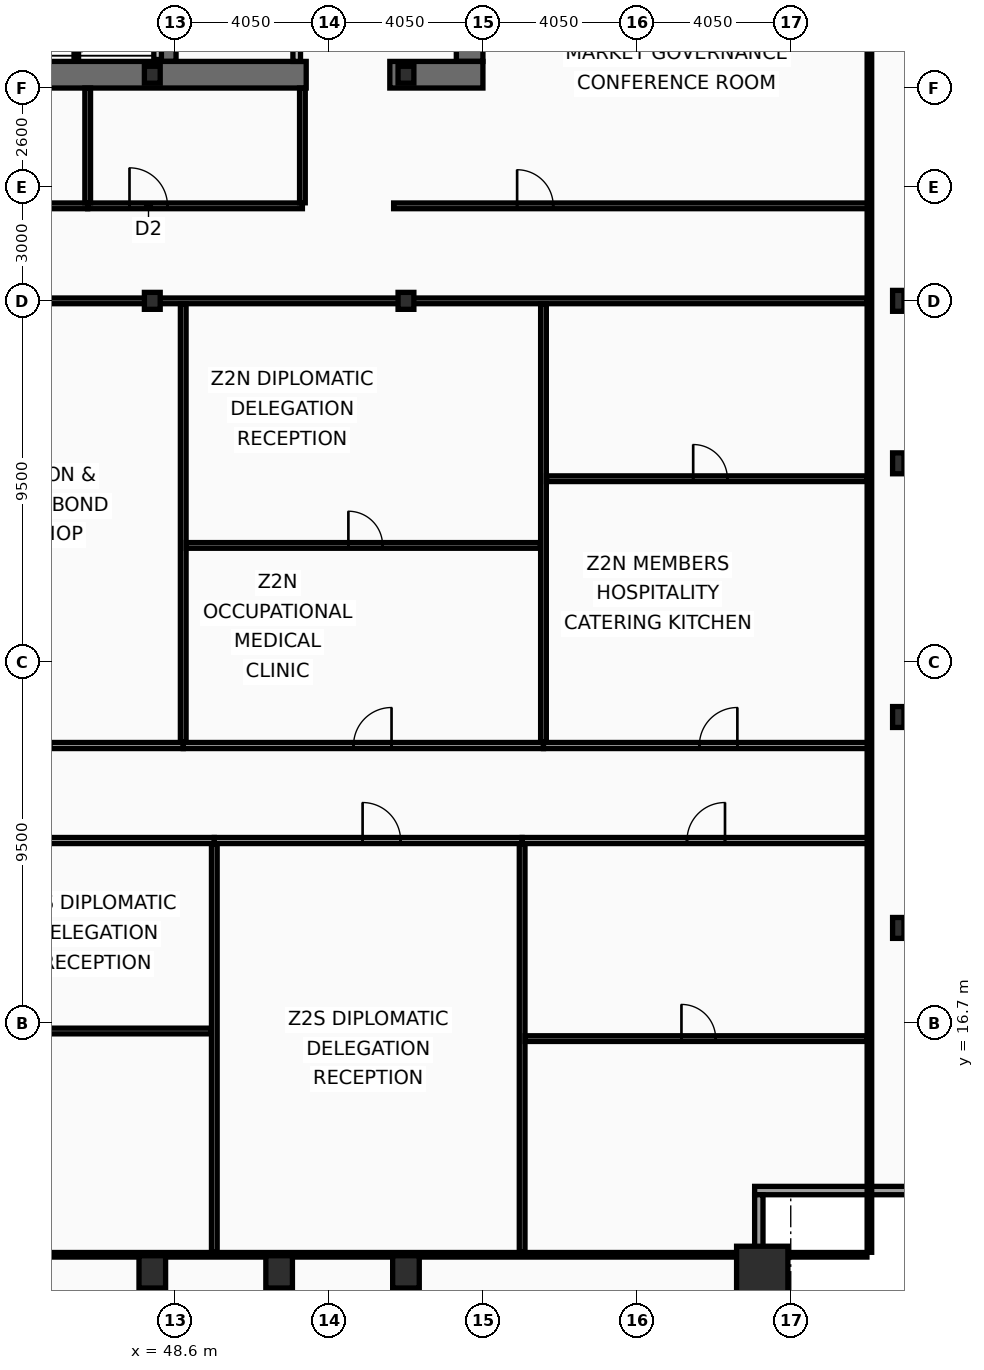
"""IFC4 building model, lengths in metres.
Left out: names, types, materials, properties, quantities, classifications, styles, units other than length and angle.
Written with IfcOpenShell. Run it as: python <this file> out.ifc"""

import sys

from ifc_helpers import new_model, si_unit, direction, frame, frame_2d, origin, origin_2d, place, context, subcontext, project, spatial, rectangle, hollow_rectangle, i_section, extrude, element, fill, save


model = new_model("IFC4")
c1 = context("Model", 3, precision=1e-05, world=origin(), true_north=direction((0.0, 1.0)))
c2 = subcontext(c1, "Body", "Model", "MODEL_VIEW")
j1 = project(units=[si_unit("LENGTHUNIT", "METRE"), si_unit("PLANEANGLEUNIT", "RADIAN")], contexts=[c1])
p1 = place(None, origin())
s1 = spatial("IfcSite", under=j1, at=p1, CompositionType="ELEMENT")
p2 = place(p1, origin())
s2 = spatial("IfcBuilding", under=s1, at=p2, CompositionType="ELEMENT")
p3 = place(p2, frame((0.0, 0.0, 165.0)))
s3 = spatial("IfcBuildingStorey", under=s2, at=p3, CompositionType="ELEMENT", Elevation=165.0)
p4 = place(p3, frame((56.35, 53.0, 0.0), z_axis=(0.0, 0.0, 1.0), x_axis=(0.0, -1.0, 0.0)))
e1 = element("IfcWall", 1, at=p4, inside=s3, PredefinedType="SHEAR", context=c2, shape_type="SweptSolid", body=[
    extrude(rectangle(XDim=11.0, YDim=0.7, at=frame_2d((5.5, 0.0))), origin(), (0.0, 0.0, 1.0), 3.44),
])
p5 = place(p3, frame((48.4, 42.0, 0.0), z_axis=(0.0, 0.0, 1.0), x_axis=(0.0, 1.0, 0.0)))
e2 = element("IfcWall", 2, at=p5, inside=s3, PredefinedType="SHEAR", context=c2, shape_type="SweptSolid", body=[
    extrude(rectangle(XDim=11.0, YDim=0.45, at=frame_2d((5.5, 0.0))), origin(), (0.0, 0.0, 1.0), 3.44),
])
p6 = place(p3, frame((52.05, 41.65, 0.0), z_axis=(0.0, 0.0, 1.0), x_axis=(-1.0, 0.0, 0.0)))
e3 = element("IfcWall", 3, at=p6, inside=s3, PredefinedType="SHEAR", context=c2, shape_type="SweptSolid", body=[
    extrude(rectangle(XDim=11.3, YDim=0.7, at=frame_2d((5.65, 0.0))), origin(), (0.0, 0.0, 1.0), 3.44),
])
p7 = place(p3, frame((56.7, 41.65, 0.0), z_axis=(0.0, 0.0, 1.0), x_axis=(-1.0, 0.0, 0.0)))
e4 = element("IfcWall", 4, at=p7, inside=s3, PredefinedType="SHEAR", context=c2, shape_type="SweptSolid", body=[
    extrude(rectangle(XDim=2.45, YDim=0.7, at=frame_2d((1.225, 0.0))), origin(), (0.0, 0.0, 1.0), 3.44),
])
p8 = place(p3, frame((64.05, 10.15, 0.0), z_axis=(0.0, 0.0, 1.0), x_axis=(1.0, 0.0, 0.0)))
e5 = element("IfcColumn", 5, at=p8, inside=s3, PredefinedType="COLUMN", context=c2, shape_type="SweptSolid", body=[
    extrude(hollow_rectangle(XDim=1.35, YDim=1.35, WallThickness=0.065, at=origin_2d()), origin(), (0.0, 0.0, 1.0), 3.6),
])
for number, where, z_axis, x_axis in (
    (6, (48.0, 10.15, 0.0), (0.0, 0.0, 1.0), (1.0, 0.0, 0.0)),
    (7, (51.337, 10.15, 0.0), (0.0, 0.0, 1.0), (1.0, 0.0, 0.0)),
    (8, (54.675, 10.15, 0.0), (0.0, 0.0, 1.0), (1.0, 0.0, 0.0)),
):
    element("IfcColumn", number, at=place(p3, frame(where, z_axis=z_axis, x_axis=x_axis)), inside=s3, PredefinedType="COLUMN", context=c2, shape_type="SweptSolid", body=[
        extrude(hollow_rectangle(XDim=0.7, YDim=0.85, WallThickness=0.05, at=origin_2d()), origin(), (0.0, 0.0, 1.0), 3.6),
    ])
for number, where, z_axis, x_axis in (
    (9, (67.63, 19.2, 0.0), (0.0, 0.0, 1.0), (1.0, 0.0, 0.0)),
    (10, (67.63, 24.75, 0.0), (0.0, 0.0, 1.0), (1.0, 0.0, 0.0)),
    (11, (67.63, 31.425, 0.0), (0.0, 0.0, 1.0), (1.0, 0.0, 0.0)),
    (12, (67.63, 35.7, 0.0), (0.0, 0.0, 1.0), (1.0, 0.0, 0.0)),
):
    element("IfcColumn", number, at=place(p3, frame(where, z_axis=z_axis, x_axis=x_axis)), inside=s3, PredefinedType="COLUMN", context=c2, shape_type="SweptSolid", body=[
        extrude(i_section(OverallWidth=0.3, OverallDepth=0.55, WebThickness=0.015, FlangeThickness=0.029, at=origin_2d()), origin(), (0.0, 0.0, 1.0), 3.6),
    ])
for number, where, z_axis, x_axis in (
    (13, (48.0, 35.7, 0.0), (0.0, 0.0, 1.0), (1.0, 0.0, 0.0)),
    (14, (48.0, 41.65, 0.0), (0.0, 0.0, 1.0), (1.0, 0.0, 0.0)),
    (15, (54.675, 35.7, 0.0), (0.0, 0.0, 1.0), (1.0, 0.0, 0.0)),
    (16, (54.675, 41.65, 0.0), (0.0, 0.0, 1.0), (1.0, 0.0, 0.0)),
):
    element("IfcColumn", number, at=place(p3, frame(where, z_axis=z_axis, x_axis=x_axis)), inside=s3, PredefinedType="COLUMN", context=c2, shape_type="SweptSolid", body=[
        extrude(i_section(OverallWidth=0.416, OverallDepth=0.446, WebThickness=0.039, FlangeThickness=0.063, at=origin_2d()), origin(), (0.0, 0.0, 1.0), 3.6),
    ])
p9 = place(p3, frame((68.07, 12.29, 0.0), z_axis=(0.0, 0.0, 1.0), x_axis=(-1.0, 0.0, 0.0)))
e17 = element("IfcWall", 17, at=p9, inside=s3, PredefinedType="SOLIDWALL", context=c2, shape_type="SweptSolid", body=[
    extrude(rectangle(XDim=4.22, YDim=0.22, at=frame_2d((2.11, 0.0))), origin(), (0.0, 0.0, 1.0), 2.83),
])
p10 = place(p3, frame((63.96, 12.18, 0.0), z_axis=(0.0, 0.0, 1.0), x_axis=(0.0, -1.0, 0.0)))
e18 = element("IfcWall", 18, at=p10, inside=s3, PredefinedType="SOLIDWALL", context=c2, shape_type="SweptSolid", body=[
    extrude(rectangle(XDim=3.91, YDim=0.22, at=frame_2d((1.955, 0.0))), origin(), (0.0, 0.0, 1.0), 2.83),
])
p11 = place(p3, frame((51.8, 42.0, 0.0), z_axis=(0.0, 0.0, 1.0), x_axis=(0.0, 1.0, 0.0)))
e19 = element("IfcWall", 19, at=p11, inside=s3, PredefinedType="PARTITIONING", context=c2, shape_type="SweptSolid", body=[
    extrude(rectangle(XDim=2.495, YDim=0.2, at=frame_2d((1.248, 0.0))), origin(), (0.0, 0.0, 1.0), 3.44),
])
p12 = place(p11, frame((0.38, 0.0, 0.0)))
e20 = element("IfcOpeningElement", 20, at=p12, cuts=e19, PredefinedType="OPENING", context=c2, shape_type="SweptSolid", body=[
    extrude(rectangle(XDim=1.05, YDim=2.15, at=frame_2d((0.525, 1.075))), frame((0.0, 0.11, 0.0), z_axis=(0.0, -1.0, 0.0), x_axis=(1.0, 0.0, 0.0)), (0.0, 0.0, 1.0), 0.22),
])
p13 = place(p3, frame((48.14, 42.05, 0.0), z_axis=(0.0, 0.0, 1.0), x_axis=(0.0, 1.0, 0.0)))
e21 = element("IfcWall", 21, at=p13, inside=s3, PredefinedType="PARTITIONING", context=c2, shape_type="SweptSolid", body=[
    extrude(rectangle(XDim=2.195, YDim=0.2, at=frame_2d((1.098, 0.0))), origin(), (0.0, 0.0, 1.0), 3.44),
])
p14 = place(p3, frame((46.0, 42.05, 0.0), z_axis=(0.0, 0.0, 1.0), x_axis=(0.0, 1.0, 0.0)))
e22 = element("IfcWall", 22, at=p14, inside=s3, PredefinedType="PARTITIONING", context=c2, shape_type="SweptSolid", body=[
    extrude(rectangle(XDim=2.195, YDim=0.12, at=frame_2d((1.098, 0.0))), origin(), (0.0, 0.0, 1.0), 3.44),
])
p15 = place(p3, frame((40.88, 38.2, 0.0), z_axis=(0.0, 0.0, 1.0), x_axis=(1.0, 0.0, 0.0)))
e23 = element("IfcWall", 23, at=p15, inside=s3, PredefinedType="PARTITIONING", context=c2, shape_type="SweptSolid", body=[
    extrude(rectangle(XDim=5.42, YDim=0.15, at=frame_2d((2.71, 0.0))), origin(), (0.0, 0.0, 1.0), 2.73),
])
p16 = place(p15, frame((1.1, 0.0, 0.0)))
e24 = element("IfcOpeningElement", 24, at=p16, cuts=e23, PredefinedType="OPENING", context=c2, shape_type="SweptSolid", body=[
    extrude(rectangle(XDim=0.9, YDim=2.05, at=frame_2d((0.45, 1.025))), frame((0.0, 0.085, 0.0), z_axis=(0.0, -1.0, 0.0), x_axis=(1.0, 0.0, 0.0)), (0.0, 0.0, 1.0), 0.17),
])
p17 = place(p3, frame((46.3, 38.2, 0.0), z_axis=(0.0, 0.0, 1.0), x_axis=(1.0, 0.0, 0.0)))
e25 = element("IfcWall", 25, at=p17, inside=s3, PredefinedType="PARTITIONING", context=c2, shape_type="SweptSolid", body=[
    extrude(rectangle(XDim=5.65, YDim=0.15, at=frame_2d((2.825, 0.0))), origin(), (0.0, 0.0, 1.0), 2.73),
])
p18 = place(p17, frame((1.1, 0.0, 0.0)))
e26 = element("IfcOpeningElement", 26, at=p18, cuts=e25, PredefinedType="OPENING", context=c2, shape_type="SweptSolid", body=[
    extrude(rectangle(XDim=1.0, YDim=2.05, at=frame_2d((0.5, 1.025))), frame((0.0, 0.085, 0.0), z_axis=(0.0, -1.0, 0.0), x_axis=(1.0, 0.0, 0.0)), (0.0, 0.0, 1.0), 0.17),
])
for number, where, z_axis, x_axis in (
    (27, (46.3, 38.28, 0.0), (0.0, 0.0, 1.0), (0.0, 1.0, 0.0)),
    (28, (51.95, 38.28, 0.0), (0.0, 0.0, 1.0), (0.0, 1.0, 0.0)),
):
    element("IfcWall", number, at=place(p3, frame(where, z_axis=z_axis, x_axis=x_axis)), inside=s3, PredefinedType="PARTITIONING", context=c2, shape_type="SweptSolid", body=[
        extrude(rectangle(XDim=3.02, YDim=0.15, at=frame_2d((1.51, 0.0))), origin(), (0.0, 0.0, 1.0), 3.44),
    ])
p19 = place(p3, frame((54.35, 38.2, 0.0), z_axis=(0.0, 0.0, 1.0), x_axis=(1.0, 0.0, 0.0)))
e29 = element("IfcWall", 29, at=p19, inside=s3, PredefinedType="PARTITIONING", context=c2, shape_type="SweptSolid", body=[
    extrude(rectangle(XDim=12.52, YDim=0.15, at=frame_2d((6.26, 0.0))), origin(), (0.0, 0.0, 1.0), 2.73),
])
p20 = place(p19, frame((3.25, 0.0, 0.0)))
e30 = element("IfcOpeningElement", 30, at=p20, cuts=e29, PredefinedType="OPENING", context=c2, shape_type="SweptSolid", body=[
    extrude(rectangle(XDim=0.95, YDim=2.05, at=frame_2d((0.475, 1.025))), frame((0.0, 0.085, 0.0), z_axis=(0.0, -1.0, 0.0), x_axis=(1.0, 0.0, 0.0)), (0.0, 0.0, 1.0), 0.17),
])
p21 = place(p3, frame((37.631, 21.5, 0.0), z_axis=(0.0, 0.0, 1.0), x_axis=(1.0, 0.0, 0.0)))
e31 = element("IfcWall", 31, at=p21, inside=s3, PredefinedType="PARTITIONING", context=c2, shape_type="SweptSolid", body=[
    extrude(rectangle(XDim=12.0, YDim=0.16, at=frame_2d((6.0, 0.0))), origin(), (0.0, 0.0, 1.0), 2.73),
])
p22 = place(p21, frame((5.54, 0.0, 0.0)))
e32 = element("IfcOpeningElement", 32, at=p22, cuts=e31, PredefinedType="OPENING", context=c2, shape_type="SweptSolid", body=[
    extrude(rectangle(XDim=1.0, YDim=2.05, at=frame_2d((0.5, 1.025))), frame((0.0, 0.09, 0.0), z_axis=(0.0, -1.0, 0.0), x_axis=(1.0, 0.0, 0.0)), (0.0, 0.0, 1.0), 0.18),
])
p23 = place(p3, frame((37.711, 16.488, 0.0), z_axis=(0.0, 0.0, 1.0), x_axis=(1.0, 0.0, 0.0)))
e33 = element("IfcWall", 33, at=p23, inside=s3, PredefinedType="PARTITIONING", context=c2, shape_type="SweptSolid", body=[
    extrude(rectangle(XDim=11.841, YDim=0.15, at=frame_2d((5.92, 0.0))), origin(), (0.0, 0.0, 1.0), 2.73),
])
p24 = place(p23, frame((5.4, 0.0, 0.0)))
e34 = element("IfcOpeningElement", 34, at=p24, cuts=e33, PredefinedType="OPENING", context=c2, shape_type="SweptSolid", body=[
    extrude(rectangle(XDim=0.9, YDim=2.05, at=frame_2d((0.45, 1.025))), frame((0.0, 0.085, 0.0), z_axis=(0.0, -1.0, 0.0), x_axis=(1.0, 0.0, 0.0)), (0.0, 0.0, 1.0), 0.17),
])
p25 = place(p3, frame((49.632, 21.5, 0.0), z_axis=(0.0, 0.0, 1.0), x_axis=(1.0, 0.0, 0.0)))
e35 = element("IfcWall", 35, at=p25, inside=s3, PredefinedType="PARTITIONING", context=c2, shape_type="SweptSolid", body=[
    extrude(rectangle(XDim=8.1, YDim=0.16, at=frame_2d((4.05, 0.0))), origin(), (0.0, 0.0, 1.0), 2.73),
])
p26 = place(p25, frame((3.902, 0.0, 0.0)))
e36 = element("IfcOpeningElement", 36, at=p26, cuts=e35, PredefinedType="OPENING", context=c2, shape_type="SweptSolid", body=[
    extrude(rectangle(XDim=1.0, YDim=2.05, at=frame_2d((0.5, 1.025))), frame((0.0, 0.09, 0.0), z_axis=(0.0, -1.0, 0.0), x_axis=(1.0, 0.0, 0.0)), (0.0, 0.0, 1.0), 0.18),
])
p27 = place(p3, frame((49.632, 10.665, 0.0), z_axis=(0.0, 0.0, 1.0), x_axis=(0.0, 1.0, 0.0)))
e37 = element("IfcWall", 37, at=p27, inside=s3, PredefinedType="PARTITIONING", context=c2, shape_type="SweptSolid", body=[
    extrude(rectangle(XDim=10.75, YDim=0.15, at=frame_2d((5.375, 0.0))), origin(), (0.0, 0.0, 1.0), 2.93),
])
p28 = place(p3, frame((57.732, 21.5, 0.0), z_axis=(0.0, 0.0, 1.0), x_axis=(1.0, 0.0, 0.0)))
e38 = element("IfcWall", 38, at=p28, inside=s3, PredefinedType="PARTITIONING", context=c2, shape_type="SweptSolid", body=[
    extrude(rectangle(XDim=9.138, YDim=0.16, at=frame_2d((4.569, 0.0))), origin(), (0.0, 0.0, 1.0), 3.44),
])
p29 = place(p28, frame((4.338, 0.0, 0.0)))
e39 = element("IfcOpeningElement", 39, at=p29, cuts=e38, PredefinedType="OPENING", context=c2, shape_type="SweptSolid", body=[
    extrude(rectangle(XDim=1.0, YDim=2.05, at=frame_2d((0.5, 1.025))), frame((0.0, 0.09, 0.0), z_axis=(0.0, -1.0, 0.0), x_axis=(1.0, 0.0, 0.0)), (0.0, 0.0, 1.0), 0.18),
])
p30 = place(p3, frame((57.732, 10.665, 0.0), z_axis=(0.0, 0.0, 1.0), x_axis=(0.0, 1.0, 0.0)))
e40 = element("IfcWall", 40, at=p30, inside=s3, PredefinedType="PARTITIONING", context=c2, shape_type="SweptSolid", body=[
    extrude(rectangle(XDim=10.75, YDim=0.15, at=frame_2d((5.375, 0.0))), origin(), (0.0, 0.0, 1.0), 2.73),
])
p31 = place(p3, frame((57.812, 16.288, 0.0), z_axis=(0.0, 0.0, 1.0), x_axis=(1.0, 0.0, 0.0)))
e41 = element("IfcWall", 41, at=p31, inside=s3, PredefinedType="PARTITIONING", context=c2, shape_type="SweptSolid", body=[
    extrude(rectangle(XDim=8.993, YDim=0.15, at=frame_2d((4.497, 0.0))), origin(), (0.0, 0.0, 1.0), 2.83),
])
p32 = place(p31, frame((4.112, 0.0, 0.0)))
e42 = element("IfcOpeningElement", 42, at=p32, cuts=e41, PredefinedType="OPENING", context=c2, shape_type="SweptSolid", body=[
    extrude(rectangle(XDim=0.9, YDim=2.05, at=frame_2d((0.45, 1.025))), frame((0.0, 0.085, 0.0), z_axis=(0.0, -1.0, 0.0), x_axis=(1.0, 0.0, 0.0)), (0.0, 0.0, 1.0), 0.17),
])
p33 = place(p3, frame((21.81, 35.7, 0.0), z_axis=(0.0, 0.0, 1.0), x_axis=(1.0, 0.0, 0.0)))
e43 = element("IfcWall", 43, at=p33, inside=s3, PredefinedType="PARTITIONING", context=c2, shape_type="SweptSolid", body=[
    extrude(rectangle(XDim=44.995, YDim=0.15, at=frame_2d((22.498, 0.0))), origin(), (0.0, 0.0, 1.0), 2.73),
])
p34 = place(p3, frame((40.237, 24.0, 0.0), z_axis=(0.0, 0.0, 1.0), x_axis=(1.0, 0.0, 0.0)))
e44 = element("IfcWall", 44, at=p34, inside=s3, PredefinedType="PARTITIONING", context=c2, shape_type="SweptSolid", body=[
    extrude(rectangle(XDim=8.577, YDim=0.16, at=frame_2d((4.288, 0.0))), origin(), (0.0, 0.0, 1.0), 2.73),
])
p35 = place(p34, frame((4.102, 0.0, 0.0)))
e45 = element("IfcOpeningElement", 45, at=p35, cuts=e44, PredefinedType="OPENING", context=c2, shape_type="SweptSolid", body=[
    extrude(rectangle(XDim=1.0, YDim=2.05, at=frame_2d((0.5, 1.025))), frame((0.0, 0.09, 0.0), z_axis=(0.0, -1.0, 0.0), x_axis=(1.0, 0.0, 0.0)), (0.0, 0.0, 1.0), 0.18),
])
p36 = place(p3, frame((48.814, 24.0, 0.0), z_axis=(0.0, 0.0, 1.0), x_axis=(1.0, 0.0, 0.0)))
e46 = element("IfcWall", 46, at=p36, inside=s3, PredefinedType="PARTITIONING", context=c2, shape_type="SweptSolid", body=[
    extrude(rectangle(XDim=9.479, YDim=0.16, at=frame_2d((4.74, 0.0))), origin(), (0.0, 0.0, 1.0), 2.73),
])
p37 = place(p36, frame((4.481, 0.0, 0.0)))
e47 = element("IfcOpeningElement", 47, at=p37, cuts=e46, PredefinedType="OPENING", context=c2, shape_type="SweptSolid", body=[
    extrude(rectangle(XDim=1.0, YDim=2.05, at=frame_2d((0.5, 1.025))), frame((0.0, 0.09, 0.0), z_axis=(0.0, -1.0, 0.0), x_axis=(1.0, 0.0, 0.0)), (0.0, 0.0, 1.0), 0.18),
])
p38 = place(p3, frame((48.814, 24.085, 0.0), z_axis=(0.0, 0.0, 1.0), x_axis=(0.0, 1.0, 0.0)))
e48 = element("IfcWall", 48, at=p38, inside=s3, PredefinedType="PARTITIONING", context=c2, shape_type="SweptSolid", body=[
    extrude(rectangle(XDim=11.535, YDim=0.15, at=frame_2d((5.768, 0.0))), origin(), (0.0, 0.0, 1.0), 2.93),
])
p39 = place(p3, frame((48.894, 29.265, 0.0), z_axis=(0.0, 0.0, 1.0), x_axis=(1.0, 0.0, 0.0)))
e49 = element("IfcWall", 49, at=p39, inside=s3, PredefinedType="PARTITIONING", context=c2, shape_type="SweptSolid", body=[
    extrude(rectangle(XDim=9.319, YDim=0.15, at=frame_2d((4.66, 0.0))), origin(), (0.0, 0.0, 1.0), 2.73),
])
p40 = place(p39, frame((4.266, 0.0, 0.0)))
e50 = element("IfcOpeningElement", 50, at=p40, cuts=e49, PredefinedType="OPENING", context=c2, shape_type="SweptSolid", body=[
    extrude(rectangle(XDim=0.9, YDim=2.05, at=frame_2d((0.45, 1.025))), frame((0.0, 0.085, 0.0), z_axis=(0.0, -1.0, 0.0), x_axis=(1.0, 0.0, 0.0)), (0.0, 0.0, 1.0), 0.17),
])
p41 = place(p3, frame((58.293, 24.0, 0.0), z_axis=(0.0, 0.0, 1.0), x_axis=(1.0, 0.0, 0.0)))
e51 = element("IfcWall", 51, at=p41, inside=s3, PredefinedType="PARTITIONING", context=c2, shape_type="SweptSolid", body=[
    extrude(rectangle(XDim=8.577, YDim=0.16, at=frame_2d((4.288, 0.0))), origin(), (0.0, 0.0, 1.0), 3.44),
])
p42 = place(p41, frame((4.102, 0.0, 0.0)))
e52 = element("IfcOpeningElement", 52, at=p42, cuts=e51, PredefinedType="OPENING", context=c2, shape_type="SweptSolid", body=[
    extrude(rectangle(XDim=1.0, YDim=2.05, at=frame_2d((0.5, 1.025))), frame((0.0, 0.09, 0.0), z_axis=(0.0, -1.0, 0.0), x_axis=(1.0, 0.0, 0.0)), (0.0, 0.0, 1.0), 0.18),
])
p43 = place(p3, frame((58.293, 24.085, 0.0), z_axis=(0.0, 0.0, 1.0), x_axis=(0.0, 1.0, 0.0)))
e53 = element("IfcWall", 53, at=p43, inside=s3, PredefinedType="PARTITIONING", context=c2, shape_type="SweptSolid", body=[
    extrude(rectangle(XDim=11.535, YDim=0.15, at=frame_2d((5.768, 0.0))), origin(), (0.0, 0.0, 1.0), 2.73),
])
p44 = place(p3, frame((58.373, 31.02, 0.0), z_axis=(0.0, 0.0, 1.0), x_axis=(1.0, 0.0, 0.0)))
e54 = element("IfcWall", 54, at=p44, inside=s3, PredefinedType="PARTITIONING", context=c2, shape_type="SweptSolid", body=[
    extrude(rectangle(XDim=8.432, YDim=0.15, at=frame_2d((4.216, 0.0))), origin(), (0.0, 0.0, 1.0), 2.73),
])
p45 = place(p44, frame((3.86, 0.0, 0.0)))
e55 = element("IfcOpeningElement", 55, at=p45, cuts=e54, PredefinedType="OPENING", context=c2, shape_type="SweptSolid", body=[
    extrude(rectangle(XDim=0.9, YDim=2.05, at=frame_2d((0.45, 1.025))), frame((0.0, 0.085, 0.0), z_axis=(0.0, -1.0, 0.0), x_axis=(1.0, 0.0, 0.0)), (0.0, 0.0, 1.0), 0.17),
])
p46 = place(p3, frame((66.87, 10.665, 0.0), z_axis=(0.0, 0.0, 1.0), x_axis=(0.0, 1.0, 0.0)))
e56 = element("IfcWall", 56, at=p46, inside=s3, PredefinedType="PARTITIONING", context=c2, shape_type="SweptSolid", body=[
    extrude(rectangle(XDim=42.11, YDim=0.12, at=frame_2d((21.055, 0.0))), origin(), (0.0, 0.0, 1.0), 2.73),
])
p47 = place(p3, frame((6.095, 10.6, 0.0), z_axis=(0.0, 0.0, 1.0), x_axis=(1.0, 0.0, 0.0)))
e57 = element("IfcWall", 57, at=p47, inside=s3, PredefinedType="PARTITIONING", context=c2, shape_type="SweptSolid", body=[
    extrude(rectangle(XDim=60.71, YDim=0.12, at=frame_2d((30.355, 0.0))), origin(), (0.0, 0.0, 1.0), 2.73),
])
p48 = place(p18, origin())
e58 = element("IfcDoor", 58, at=p48, inside=s3, OperationType="SINGLE_SWING_LEFT", PredefinedType="DOOR", context=c2, shape_type="SweptSolid", body=[
    extrude(rectangle(XDim=1.0, YDim=2.05, at=frame_2d((0.5, 1.025))), frame((0.0, 0.025, 0.0), z_axis=(0.0, -1.0, 0.0), x_axis=(1.0, 0.0, 0.0)), (0.0, 0.0, 1.0), 0.05),
])
fill(e26, e58)
p49 = place(p20, origin())
e59 = element("IfcDoor", 59, at=p49, inside=s3, OperationType="SINGLE_SWING_LEFT", PredefinedType="DOOR", context=c2, shape_type="SweptSolid", body=[
    extrude(rectangle(XDim=0.95, YDim=2.05, at=frame_2d((0.475, 1.025))), frame((0.0, 0.025, 0.0), z_axis=(0.0, -1.0, 0.0), x_axis=(1.0, 0.0, 0.0)), (0.0, 0.0, 1.0), 0.05),
])
fill(e30, e59)
p50 = place(p26, origin())
e60 = element("IfcDoor", 60, at=p50, inside=s3, OperationType="SINGLE_SWING_LEFT", PredefinedType="DOOR", context=c2, shape_type="SweptSolid", body=[
    extrude(rectangle(XDim=1.0, YDim=2.05, at=frame_2d((0.5, 1.025))), frame((0.0, 0.025, 0.0), z_axis=(0.0, -1.0, 0.0), x_axis=(1.0, 0.0, 0.0)), (0.0, 0.0, 1.0), 0.05),
])
fill(e36, e60)
p51 = place(p29, origin())
e61 = element("IfcDoor", 61, at=p51, inside=s3, OperationType="SINGLE_SWING_RIGHT", PredefinedType="DOOR", context=c2, shape_type="SweptSolid", body=[
    extrude(rectangle(XDim=1.0, YDim=2.05, at=frame_2d((0.5, 1.025))), frame((0.0, 0.025, 0.0), z_axis=(0.0, -1.0, 0.0), x_axis=(1.0, 0.0, 0.0)), (0.0, 0.0, 1.0), 0.05),
])
fill(e39, e61)
p52 = place(p32, origin())
e62 = element("IfcDoor", 62, at=p52, inside=s3, OperationType="SINGLE_SWING_LEFT", PredefinedType="DOOR", context=c2, shape_type="SweptSolid", body=[
    extrude(rectangle(XDim=0.9, YDim=2.05, at=frame_2d((0.45, 1.025))), frame((0.0, 0.025, 0.0), z_axis=(0.0, -1.0, 0.0), x_axis=(1.0, 0.0, 0.0)), (0.0, 0.0, 1.0), 0.05),
])
fill(e42, e62)
p53 = place(p37, origin())
e63 = element("IfcDoor", 63, at=p53, inside=s3, OperationType="SINGLE_SWING_RIGHT", PredefinedType="DOOR", context=c2, shape_type="SweptSolid", body=[
    extrude(rectangle(XDim=1.0, YDim=2.05, at=frame_2d((0.5, 1.025))), frame((0.0, 0.025, 0.0), z_axis=(0.0, -1.0, 0.0), x_axis=(1.0, 0.0, 0.0)), (0.0, 0.0, 1.0), 0.05),
])
fill(e47, e63)
p54 = place(p40, origin())
e64 = element("IfcDoor", 64, at=p54, inside=s3, OperationType="SINGLE_SWING_LEFT", PredefinedType="DOOR", context=c2, shape_type="SweptSolid", body=[
    extrude(rectangle(XDim=0.9, YDim=2.05, at=frame_2d((0.45, 1.025))), frame((0.0, 0.025, 0.0), z_axis=(0.0, -1.0, 0.0), x_axis=(1.0, 0.0, 0.0)), (0.0, 0.0, 1.0), 0.05),
])
fill(e50, e64)
p55 = place(p42, origin())
e65 = element("IfcDoor", 65, at=p55, inside=s3, OperationType="SINGLE_SWING_RIGHT", PredefinedType="DOOR", context=c2, shape_type="SweptSolid", body=[
    extrude(rectangle(XDim=1.0, YDim=2.05, at=frame_2d((0.5, 1.025))), frame((0.0, 0.025, 0.0), z_axis=(0.0, -1.0, 0.0), x_axis=(1.0, 0.0, 0.0)), (0.0, 0.0, 1.0), 0.05),
])
fill(e52, e65)
p56 = place(p45, origin())
e66 = element("IfcDoor", 66, at=p56, inside=s3, OperationType="SINGLE_SWING_LEFT", PredefinedType="DOOR", context=c2, shape_type="SweptSolid", body=[
    extrude(rectangle(XDim=0.9, YDim=2.05, at=frame_2d((0.45, 1.025))), frame((0.0, 0.025, 0.0), z_axis=(0.0, -1.0, 0.0), x_axis=(1.0, 0.0, 0.0)), (0.0, 0.0, 1.0), 0.05),
])
fill(e55, e66)
save(model, sys.argv[1])
